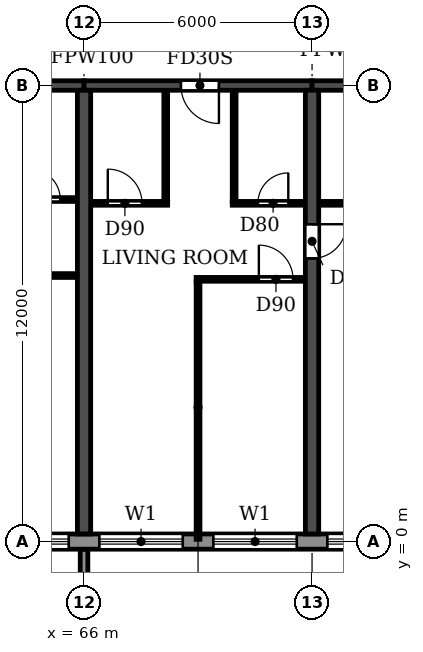
"""IFC4 building model, lengths in metres.
Left out: names, types, materials, properties, quantities, classifications, styles, units other than length and angle.
Written with IfcOpenShell. Run it as: python <this file> out.ifc"""

import sys

from ifc_helpers import new_model, si_unit, direction, frame, frame_2d, origin, place, context, subcontext, project, spatial, polyline, rectangle, outline, extrude, source, transform, mapped, element, fill, save


model = new_model("IFC4")
c1 = context("Model", 3, precision=1e-05, world=origin(), true_north=direction((0.0, 1.0)))
c2 = subcontext(c1, "Body", "Model", "MODEL_VIEW")
j1 = project(units=[si_unit("LENGTHUNIT", "METRE"), si_unit("PLANEANGLEUNIT", "RADIAN")], contexts=[c1])
p1 = place(None, origin())
s1 = spatial("IfcSite", under=j1, at=p1, CompositionType="ELEMENT")
p2 = place(p1, origin())
s2 = spatial("IfcBuilding", under=s1, at=p2, CompositionType="ELEMENT")
p3 = place(p2, frame((0.0, 0.0, 102.6)))
s3 = spatial("IfcBuildingStorey", under=s2, at=p3, CompositionType="ELEMENT", Elevation=102.6)
p4 = place(p3, frame((66.0, 0.2, 0.0), z_axis=(0.0, 0.0, 1.0), x_axis=(0.0, 1.0, 0.0)))
e1 = element("IfcWall", 1, at=p4, inside=s3, PredefinedType="SHEAR", context=c2, shape_type="SweptSolid", body=[
    extrude(rectangle(XDim=11.675, YDim=0.35, at=frame_2d((5.837, 0.0))), origin(), (0.0, 0.0, 1.0), 3.0),
])
p5 = place(p3, frame((72.0, 0.2, 0.0), z_axis=(0.0, 0.0, 1.0), x_axis=(0.0, 1.0, 0.0)))
e2 = element("IfcWall", 2, at=p5, inside=s3, PredefinedType="SHEAR", context=c2, shape_type="SweptSolid", body=[
    extrude(rectangle(XDim=11.675, YDim=0.35, at=frame_2d((5.837, 0.0))), origin(), (0.0, 0.0, 1.0), 3.0),
])
p6 = place(p5, frame((7.25, 0.0, 0.0)))
e3 = element("IfcOpeningElement", 3, at=p6, cuts=e2, PredefinedType="OPENING", context=c2, shape_type="SweptSolid", body=[
    extrude(rectangle(XDim=0.9, YDim=2.1, at=frame_2d((0.45, 1.05))), frame((0.0, 0.185, 0.0), z_axis=(0.0, -1.0, 0.0), x_axis=(1.0, 0.0, 0.0)), (0.0, 0.0, 1.0), 0.37),
])
p7 = place(p3, frame((60.0, 12.0, 0.0), z_axis=(0.0, 0.0, 1.0), x_axis=(1.0, 0.0, 0.0)))
e4 = element("IfcWall", 4, at=p7, inside=s3, PredefinedType="SHEAR", context=c2, shape_type="SweptSolid", body=[
    extrude(rectangle(XDim=6.0, YDim=0.25, at=frame_2d((3.0, 0.0))), origin(), (0.0, 0.0, 1.0), 2.4),
])
p8 = place(p7, frame((2.55, 0.0, 0.0)))
e5 = element("IfcOpeningElement", 5, at=p8, cuts=e4, PredefinedType="OPENING", context=c2, shape_type="SweptSolid", body=[
    extrude(rectangle(XDim=1.0, YDim=2.1, at=frame_2d((0.5, 1.05))), frame((0.0, 0.135, 0.0), z_axis=(0.0, -1.0, 0.0), x_axis=(1.0, 0.0, 0.0)), (0.0, 0.0, 1.0), 0.27),
])
p9 = place(p3, frame((66.0, 12.0, 0.0), z_axis=(0.0, 0.0, 1.0), x_axis=(1.0, 0.0, 0.0)))
e6 = element("IfcWall", 6, at=p9, inside=s3, PredefinedType="SHEAR", context=c2, shape_type="SweptSolid", body=[
    extrude(rectangle(XDim=6.0, YDim=0.25, at=frame_2d((3.0, 0.0))), origin(), (0.0, 0.0, 1.0), 2.4),
])
p10 = place(p9, frame((2.55, 0.0, 0.0)))
e7 = element("IfcOpeningElement", 7, at=p10, cuts=e6, PredefinedType="OPENING", context=c2, shape_type="SweptSolid", body=[
    extrude(rectangle(XDim=1.0, YDim=2.1, at=frame_2d((0.5, 1.05))), frame((0.0, 0.135, 0.0), z_axis=(0.0, -1.0, 0.0), x_axis=(1.0, 0.0, 0.0)), (0.0, 0.0, 1.0), 0.27),
])
p11 = place(p3, frame((72.0, 12.0, 0.0), z_axis=(0.0, 0.0, 1.0), x_axis=(1.0, 0.0, 0.0)))
e8 = element("IfcWall", 8, at=p11, inside=s3, PredefinedType="SHEAR", context=c2, shape_type="SweptSolid", body=[
    extrude(rectangle(XDim=6.0, YDim=0.25, at=frame_2d((3.0, 0.0))), origin(), (0.0, 0.0, 1.0), 2.4),
])
p12 = place(p3, frame((10.683, 0.0, 0.0), z_axis=(0.0, 0.0, 1.0), x_axis=(1.0, 0.0, 0.0)))
e9 = element("IfcWall", 9, at=p12, inside=s3, PredefinedType="STANDARD", context=c2, shape_type="SweptSolid", body=[
    extrude(rectangle(XDim=80.634, YDim=0.4, at=frame_2d((40.317, 0.0))), origin(), (0.0, 0.0, 1.0), 3.0),
])
p13 = place(p12, frame((1.717, 0.0, 0.9)))
e10 = element("IfcOpeningElement", 10, at=p13, cuts=e9, PredefinedType="OPENING", context=c2, shape_type="SweptSolid", body=[
    extrude(rectangle(XDim=2.2, YDim=1.5, at=frame_2d((1.1, 0.75))), frame((0.0, 0.21, 0.0), z_axis=(0.0, -1.0, 0.0), x_axis=(1.0, 0.0, 0.0)), (0.0, 0.0, 1.0), 0.42),
])
p14 = place(p12, frame((4.917, 0.0, 0.0)))
e11 = element("IfcOpeningElement", 11, at=p14, cuts=e9, PredefinedType="OPENING", context=c2, shape_type="SweptSolid", body=[
    extrude(rectangle(XDim=1.8, YDim=2.4, at=frame_2d((0.9, 1.2))), frame((0.0, 0.21, 0.0), z_axis=(0.0, -1.0, 0.0), x_axis=(1.0, 0.0, 0.0)), (0.0, 0.0, 1.0), 0.42),
])
p15 = place(p12, frame((7.717, 0.0, 0.9)))
e12 = element("IfcOpeningElement", 12, at=p15, cuts=e9, PredefinedType="OPENING", context=c2, shape_type="SweptSolid", body=[
    extrude(rectangle(XDim=2.2, YDim=1.5, at=frame_2d((1.1, 0.75))), frame((0.0, 0.21, 0.0), z_axis=(0.0, -1.0, 0.0), x_axis=(1.0, 0.0, 0.0)), (0.0, 0.0, 1.0), 0.42),
])
p16 = place(p12, frame((10.717, 0.0, 0.9)))
e13 = element("IfcOpeningElement", 13, at=p16, cuts=e9, PredefinedType="OPENING", context=c2, shape_type="SweptSolid", body=[
    extrude(rectangle(XDim=2.2, YDim=1.5, at=frame_2d((1.1, 0.75))), frame((0.0, 0.21, 0.0), z_axis=(0.0, -1.0, 0.0), x_axis=(1.0, 0.0, 0.0)), (0.0, 0.0, 1.0), 0.42),
])
p17 = place(p12, frame((13.717, 0.0, 0.9)))
e14 = element("IfcOpeningElement", 14, at=p17, cuts=e9, PredefinedType="OPENING", context=c2, shape_type="SweptSolid", body=[
    extrude(rectangle(XDim=2.2, YDim=1.5, at=frame_2d((1.1, 0.75))), frame((0.0, 0.21, 0.0), z_axis=(0.0, -1.0, 0.0), x_axis=(1.0, 0.0, 0.0)), (0.0, 0.0, 1.0), 0.42),
])
p18 = place(p12, frame((16.717, 0.0, 0.9)))
e15 = element("IfcOpeningElement", 15, at=p18, cuts=e9, PredefinedType="OPENING", context=c2, shape_type="SweptSolid", body=[
    extrude(rectangle(XDim=2.2, YDim=1.5, at=frame_2d((1.1, 0.75))), frame((0.0, 0.21, 0.0), z_axis=(0.0, -1.0, 0.0), x_axis=(1.0, 0.0, 0.0)), (0.0, 0.0, 1.0), 0.42),
])
p19 = place(p12, frame((19.717, 0.0, 0.9)))
e16 = element("IfcOpeningElement", 16, at=p19, cuts=e9, PredefinedType="OPENING", context=c2, shape_type="SweptSolid", body=[
    extrude(rectangle(XDim=2.2, YDim=1.5, at=frame_2d((1.1, 0.75))), frame((0.0, 0.21, 0.0), z_axis=(0.0, -1.0, 0.0), x_axis=(1.0, 0.0, 0.0)), (0.0, 0.0, 1.0), 0.42),
])
p20 = place(p12, frame((22.717, 0.0, 0.9)))
e17 = element("IfcOpeningElement", 17, at=p20, cuts=e9, PredefinedType="OPENING", context=c2, shape_type="SweptSolid", body=[
    extrude(rectangle(XDim=2.2, YDim=1.5, at=frame_2d((1.1, 0.75))), frame((0.0, 0.21, 0.0), z_axis=(0.0, -1.0, 0.0), x_axis=(1.0, 0.0, 0.0)), (0.0, 0.0, 1.0), 0.42),
])
p21 = place(p12, frame((25.717, 0.0, 0.9)))
e18 = element("IfcOpeningElement", 18, at=p21, cuts=e9, PredefinedType="OPENING", context=c2, shape_type="SweptSolid", body=[
    extrude(rectangle(XDim=2.2, YDim=1.5, at=frame_2d((1.1, 0.75))), frame((0.0, 0.21, 0.0), z_axis=(0.0, -1.0, 0.0), x_axis=(1.0, 0.0, 0.0)), (0.0, 0.0, 1.0), 0.42),
])
p22 = place(p12, frame((28.917, 0.0, 0.0)))
e19 = element("IfcOpeningElement", 19, at=p22, cuts=e9, PredefinedType="OPENING", context=c2, shape_type="SweptSolid", body=[
    extrude(rectangle(XDim=1.8, YDim=2.4, at=frame_2d((0.9, 1.2))), frame((0.0, 0.21, 0.0), z_axis=(0.0, -1.0, 0.0), x_axis=(1.0, 0.0, 0.0)), (0.0, 0.0, 1.0), 0.42),
])
p23 = place(p12, frame((31.717, 0.0, 0.9)))
e20 = element("IfcOpeningElement", 20, at=p23, cuts=e9, PredefinedType="OPENING", context=c2, shape_type="SweptSolid", body=[
    extrude(rectangle(XDim=2.2, YDim=1.5, at=frame_2d((1.1, 0.75))), frame((0.0, 0.21, 0.0), z_axis=(0.0, -1.0, 0.0), x_axis=(1.0, 0.0, 0.0)), (0.0, 0.0, 1.0), 0.42),
])
p24 = place(p12, frame((34.717, 0.0, 0.9)))
e21 = element("IfcOpeningElement", 21, at=p24, cuts=e9, PredefinedType="OPENING", context=c2, shape_type="SweptSolid", body=[
    extrude(rectangle(XDim=2.2, YDim=1.5, at=frame_2d((1.1, 0.75))), frame((0.0, 0.21, 0.0), z_axis=(0.0, -1.0, 0.0), x_axis=(1.0, 0.0, 0.0)), (0.0, 0.0, 1.0), 0.42),
])
p25 = place(p12, frame((37.717, 0.0, 0.9)))
e22 = element("IfcOpeningElement", 22, at=p25, cuts=e9, PredefinedType="OPENING", context=c2, shape_type="SweptSolid", body=[
    extrude(rectangle(XDim=2.2, YDim=1.5, at=frame_2d((1.1, 0.75))), frame((0.0, 0.21, 0.0), z_axis=(0.0, -1.0, 0.0), x_axis=(1.0, 0.0, 0.0)), (0.0, 0.0, 1.0), 0.42),
])
p26 = place(p12, frame((40.717, 0.0, 0.9)))
e23 = element("IfcOpeningElement", 23, at=p26, cuts=e9, PredefinedType="OPENING", context=c2, shape_type="SweptSolid", body=[
    extrude(rectangle(XDim=2.2, YDim=1.5, at=frame_2d((1.1, 0.75))), frame((0.0, 0.21, 0.0), z_axis=(0.0, -1.0, 0.0), x_axis=(1.0, 0.0, 0.0)), (0.0, 0.0, 1.0), 0.42),
])
p27 = place(p12, frame((43.717, 0.0, 0.9)))
e24 = element("IfcOpeningElement", 24, at=p27, cuts=e9, PredefinedType="OPENING", context=c2, shape_type="SweptSolid", body=[
    extrude(rectangle(XDim=2.2, YDim=1.5, at=frame_2d((1.1, 0.75))), frame((0.0, 0.21, 0.0), z_axis=(0.0, -1.0, 0.0), x_axis=(1.0, 0.0, 0.0)), (0.0, 0.0, 1.0), 0.42),
])
p28 = place(p12, frame((46.717, 0.0, 0.9)))
e25 = element("IfcOpeningElement", 25, at=p28, cuts=e9, PredefinedType="OPENING", context=c2, shape_type="SweptSolid", body=[
    extrude(rectangle(XDim=2.2, YDim=1.5, at=frame_2d((1.1, 0.75))), frame((0.0, 0.21, 0.0), z_axis=(0.0, -1.0, 0.0), x_axis=(1.0, 0.0, 0.0)), (0.0, 0.0, 1.0), 0.42),
])
p29 = place(p12, frame((49.917, 0.0, 0.0)))
e26 = element("IfcOpeningElement", 26, at=p29, cuts=e9, PredefinedType="OPENING", context=c2, shape_type="SweptSolid", body=[
    extrude(rectangle(XDim=1.8, YDim=2.4, at=frame_2d((0.9, 1.2))), frame((0.0, 0.21, 0.0), z_axis=(0.0, -1.0, 0.0), x_axis=(1.0, 0.0, 0.0)), (0.0, 0.0, 1.0), 0.42),
])
p30 = place(p12, frame((52.717, 0.0, 0.9)))
e27 = element("IfcOpeningElement", 27, at=p30, cuts=e9, PredefinedType="OPENING", context=c2, shape_type="SweptSolid", body=[
    extrude(rectangle(XDim=2.2, YDim=1.5, at=frame_2d((1.1, 0.75))), frame((0.0, 0.21, 0.0), z_axis=(0.0, -1.0, 0.0), x_axis=(1.0, 0.0, 0.0)), (0.0, 0.0, 1.0), 0.42),
])
p31 = place(p12, frame((55.717, 0.0, 0.9)))
e28 = element("IfcOpeningElement", 28, at=p31, cuts=e9, PredefinedType="OPENING", context=c2, shape_type="SweptSolid", body=[
    extrude(rectangle(XDim=2.2, YDim=1.5, at=frame_2d((1.1, 0.75))), frame((0.0, 0.21, 0.0), z_axis=(0.0, -1.0, 0.0), x_axis=(1.0, 0.0, 0.0)), (0.0, 0.0, 1.0), 0.42),
])
p32 = place(p12, frame((58.717, 0.0, 0.9)))
e29 = element("IfcOpeningElement", 29, at=p32, cuts=e9, PredefinedType="OPENING", context=c2, shape_type="SweptSolid", body=[
    extrude(rectangle(XDim=2.2, YDim=1.5, at=frame_2d((1.1, 0.75))), frame((0.0, 0.21, 0.0), z_axis=(0.0, -1.0, 0.0), x_axis=(1.0, 0.0, 0.0)), (0.0, 0.0, 1.0), 0.42),
])
p33 = place(p12, frame((61.717, 0.0, 0.9)))
e30 = element("IfcOpeningElement", 30, at=p33, cuts=e9, PredefinedType="OPENING", context=c2, shape_type="SweptSolid", body=[
    extrude(rectangle(XDim=2.2, YDim=1.5, at=frame_2d((1.1, 0.75))), frame((0.0, 0.21, 0.0), z_axis=(0.0, -1.0, 0.0), x_axis=(1.0, 0.0, 0.0)), (0.0, 0.0, 1.0), 0.42),
])
p34 = place(p12, frame((64.717, 0.0, 0.9)))
e31 = element("IfcOpeningElement", 31, at=p34, cuts=e9, PredefinedType="OPENING", context=c2, shape_type="SweptSolid", body=[
    extrude(rectangle(XDim=2.2, YDim=1.5, at=frame_2d((1.1, 0.75))), frame((0.0, 0.21, 0.0), z_axis=(0.0, -1.0, 0.0), x_axis=(1.0, 0.0, 0.0)), (0.0, 0.0, 1.0), 0.42),
])
p35 = place(p12, frame((67.717, 0.0, 0.9)))
e32 = element("IfcOpeningElement", 32, at=p35, cuts=e9, PredefinedType="OPENING", context=c2, shape_type="SweptSolid", body=[
    extrude(rectangle(XDim=2.2, YDim=1.5, at=frame_2d((1.1, 0.75))), frame((0.0, 0.21, 0.0), z_axis=(0.0, -1.0, 0.0), x_axis=(1.0, 0.0, 0.0)), (0.0, 0.0, 1.0), 0.42),
])
p36 = place(p12, frame((70.717, 0.0, 0.9)))
e33 = element("IfcOpeningElement", 33, at=p36, cuts=e9, PredefinedType="OPENING", context=c2, shape_type="SweptSolid", body=[
    extrude(rectangle(XDim=2.2, YDim=1.5, at=frame_2d((1.1, 0.75))), frame((0.0, 0.21, 0.0), z_axis=(0.0, -1.0, 0.0), x_axis=(1.0, 0.0, 0.0)), (0.0, 0.0, 1.0), 0.42),
])
p37 = place(p12, frame((73.717, 0.0, 0.9)))
e34 = element("IfcOpeningElement", 34, at=p37, cuts=e9, PredefinedType="OPENING", context=c2, shape_type="SweptSolid", body=[
    extrude(rectangle(XDim=2.2, YDim=1.5, at=frame_2d((1.1, 0.75))), frame((0.0, 0.21, 0.0), z_axis=(0.0, -1.0, 0.0), x_axis=(1.0, 0.0, 0.0)), (0.0, 0.0, 1.0), 0.42),
])
p38 = place(p12, frame((76.917, 0.0, 0.0)))
e35 = element("IfcOpeningElement", 35, at=p38, cuts=e9, PredefinedType="OPENING", context=c2, shape_type="SweptSolid", body=[
    extrude(rectangle(XDim=1.8, YDim=2.4, at=frame_2d((0.9, 1.2))), frame((0.0, 0.21, 0.0), z_axis=(0.0, -1.0, 0.0), x_axis=(1.0, 0.0, 0.0)), (0.0, 0.0, 1.0), 0.42),
])
m1 = source(origin(), c2, "Body", "SweptSolid", [
    extrude(outline(polyline([(0.0, 0.0), (0.2, 0.0), (0.2, 1.65), (0.0, 1.65), (0.0, 0.0)])), origin(), (0.0, 0.0, 1.0), 3.1),
])
p39 = place(p3, frame((65.9, -1.85, 0.0)))
e36 = element("IfcWall", 36, at=p39, inside=s3, PredefinedType="STANDARD", context=c2, shape_type="MappedRepresentation", body=[
    mapped(m1, transform((0.0, 0.0, 0.0))),
])
p40 = place(p3, frame((68.95, 6.9, 0.0), z_axis=(0.0, 0.0, 1.0), x_axis=(1.0, 0.0, 0.0)))
e37 = element("IfcWall", 37, at=p40, inside=s3, PredefinedType="PARTITIONING", context=c2, shape_type="SweptSolid", body=[
    extrude(rectangle(XDim=2.865, YDim=0.1, at=frame_2d((1.433, 0.0))), origin(), (0.0, 0.0, 1.0), 3.0),
])
p41 = place(p40, frame((1.65, 0.0, 0.0)))
e38 = element("IfcOpeningElement", 38, at=p41, cuts=e37, PredefinedType="OPENING", context=c2, shape_type="SweptSolid", body=[
    extrude(rectangle(XDim=0.9, YDim=2.1, at=frame_2d((0.45, 1.05))), frame((0.0, 0.06, 0.0), z_axis=(0.0, -1.0, 0.0), x_axis=(1.0, 0.0, 0.0)), (0.0, 0.0, 1.0), 0.12),
])
p42 = place(p3, frame((62.95, 7.0, 0.0), z_axis=(0.0, 0.0, 1.0), x_axis=(1.0, 0.0, 0.0)))
e39 = element("IfcWall", 39, at=p42, inside=s3, PredefinedType="PARTITIONING", context=c2, shape_type="SweptSolid", body=[
    extrude(rectangle(XDim=2.865, YDim=0.1, at=frame_2d((1.433, 0.0))), origin(), (0.0, 0.0, 1.0), 3.0),
])
p43 = place(p42, frame((0.55, 0.0, 0.0)))
e40 = element("IfcOpeningElement", 40, at=p43, cuts=e39, PredefinedType="OPENING", context=c2, shape_type="SweptSolid", body=[
    extrude(rectangle(XDim=0.9, YDim=2.1, at=frame_2d((0.45, 1.05))), frame((0.0, 0.06, 0.0), z_axis=(0.0, -1.0, 0.0), x_axis=(1.0, 0.0, 0.0)), (0.0, 0.0, 1.0), 0.12),
])
p44 = place(p3, frame((66.185, 8.9, 0.0), z_axis=(0.0, 0.0, 1.0), x_axis=(1.0, 0.0, 0.0)))
e41 = element("IfcWall", 41, at=p44, inside=s3, PredefinedType="PARTITIONING", context=c2, shape_type="SweptSolid", body=[
    extrude(rectangle(XDim=2.015, YDim=0.1, at=frame_2d((1.007, 0.0))), origin(), (0.0, 0.0, 1.0), 3.0),
])
p45 = place(p44, frame((0.44, 0.0, 0.0)))
e42 = element("IfcOpeningElement", 42, at=p45, cuts=e41, PredefinedType="OPENING", context=c2, shape_type="SweptSolid", body=[
    extrude(rectangle(XDim=0.9, YDim=2.1, at=frame_2d((0.45, 1.05))), frame((0.0, 0.06, 0.0), z_axis=(0.0, -1.0, 0.0), x_axis=(1.0, 0.0, 0.0)), (0.0, 0.0, 1.0), 0.12),
])
p46 = place(p3, frame((69.9, 8.9, 0.0), z_axis=(0.0, 0.0, 1.0), x_axis=(1.0, 0.0, 0.0)))
e43 = element("IfcWall", 43, at=p46, inside=s3, PredefinedType="PARTITIONING", context=c2, shape_type="SweptSolid", body=[
    extrude(rectangle(XDim=1.915, YDim=0.1, at=frame_2d((0.958, 0.0))), origin(), (0.0, 0.0, 1.0), 3.0),
])
p47 = place(p46, frame((0.675, 0.0, 0.0)))
e44 = element("IfcOpeningElement", 44, at=p47, cuts=e43, PredefinedType="OPENING", context=c2, shape_type="SweptSolid", body=[
    extrude(rectangle(XDim=0.8, YDim=2.1, at=frame_2d((0.4, 1.05))), frame((0.0, 0.06, 0.0), z_axis=(0.0, -1.0, 0.0), x_axis=(1.0, 0.0, 0.0)), (0.0, 0.0, 1.0), 0.12),
])
p48 = place(p3, frame((72.185, 8.9, 0.0), z_axis=(0.0, 0.0, 1.0), x_axis=(1.0, 0.0, 0.0)))
e45 = element("IfcWall", 45, at=p48, inside=s3, PredefinedType="PARTITIONING", context=c2, shape_type="SweptSolid", body=[
    extrude(rectangle(XDim=2.715, YDim=0.1, at=frame_2d((1.357, 0.0))), origin(), (0.0, 0.0, 1.0), 3.0),
])
p49 = place(p48, frame((0.915, 0.0, 0.0)))
e46 = element("IfcOpeningElement", 46, at=p49, cuts=e45, PredefinedType="OPENING", context=c2, shape_type="SweptSolid", body=[
    extrude(rectangle(XDim=0.8, YDim=2.1, at=frame_2d((0.4, 1.05))), frame((0.0, 0.06, 0.0), z_axis=(0.0, -1.0, 0.0), x_axis=(1.0, 0.0, 0.0)), (0.0, 0.0, 1.0), 0.12),
])
p50 = place(p3, frame((63.9, 9.0, 0.0), z_axis=(0.0, 0.0, 1.0), x_axis=(1.0, 0.0, 0.0)))
e47 = element("IfcWall", 47, at=p50, inside=s3, PredefinedType="PARTITIONING", context=c2, shape_type="SweptSolid", body=[
    extrude(rectangle(XDim=1.915, YDim=0.1, at=frame_2d((0.958, 0.0))), origin(), (0.0, 0.0, 1.0), 3.0),
])
p51 = place(p50, frame((0.675, 0.0, 0.0)))
e48 = element("IfcOpeningElement", 48, at=p51, cuts=e47, PredefinedType="OPENING", context=c2, shape_type="SweptSolid", body=[
    extrude(rectangle(XDim=0.8, YDim=2.1, at=frame_2d((0.4, 1.05))), frame((0.0, 0.06, 0.0), z_axis=(0.0, -1.0, 0.0), x_axis=(1.0, 0.0, 0.0)), (0.0, 0.0, 1.0), 0.12),
])
p52 = place(p3, frame((68.15, 8.95, 0.0), z_axis=(0.0, 0.0, 1.0), x_axis=(0.0, 1.0, 0.0)))
e49 = element("IfcWall", 49, at=p52, inside=s3, PredefinedType="PARTITIONING", context=c2, shape_type="SweptSolid", body=[
    extrude(rectangle(XDim=2.915, YDim=0.1, at=frame_2d((1.458, 0.0))), origin(), (0.0, 0.0, 1.0), 3.0),
])
p53 = place(p3, frame((69.0, 0.06, 0.0), z_axis=(0.0, 0.0, 1.0), x_axis=(0.0, 1.0, 0.0)))
e50 = element("IfcWall", 50, at=p53, inside=s3, PredefinedType="PARTITIONING", context=c2, shape_type="SweptSolid", body=[
    extrude(rectangle(XDim=6.79, YDim=0.1, at=frame_2d((3.395, 0.0))), origin(), (0.0, 0.0, 1.0), 3.0),
])
p54 = place(p3, frame((69.95, 8.95, 0.0), z_axis=(0.0, 0.0, 1.0), x_axis=(0.0, 1.0, 0.0)))
e51 = element("IfcWall", 51, at=p54, inside=s3, PredefinedType="PARTITIONING", context=c2, shape_type="SweptSolid", body=[
    extrude(rectangle(XDim=2.915, YDim=0.1, at=frame_2d((1.458, 0.0))), origin(), (0.0, 0.0, 1.0), 3.0),
])
p55 = place(p30, origin())
e52 = element("IfcWindow", 52, at=p55, inside=s3, PartitioningType="DOUBLE_PANEL_HORIZONTAL", PredefinedType="WINDOW", context=c2, shape_type="SweptSolid", body=[
    extrude(rectangle(XDim=2.2, YDim=1.5, at=frame_2d((1.1, 0.75))), frame((0.0, 0.03, 0.0), z_axis=(0.0, -1.0, 0.0), x_axis=(1.0, 0.0, 0.0)), (0.0, 0.0, 1.0), 0.06),
])
fill(e27, e52)
p56 = place(p31, origin())
e53 = element("IfcWindow", 53, at=p56, inside=s3, PartitioningType="DOUBLE_PANEL_HORIZONTAL", PredefinedType="WINDOW", context=c2, shape_type="SweptSolid", body=[
    extrude(rectangle(XDim=2.2, YDim=1.5, at=frame_2d((1.1, 0.75))), frame((0.0, 0.03, 0.0), z_axis=(0.0, -1.0, 0.0), x_axis=(1.0, 0.0, 0.0)), (0.0, 0.0, 1.0), 0.06),
])
fill(e28, e53)
p57 = place(p32, origin())
e54 = element("IfcWindow", 54, at=p57, inside=s3, PartitioningType="DOUBLE_PANEL_HORIZONTAL", PredefinedType="WINDOW", context=c2, shape_type="SweptSolid", body=[
    extrude(rectangle(XDim=2.2, YDim=1.5, at=frame_2d((1.1, 0.75))), frame((0.0, 0.03, 0.0), z_axis=(0.0, -1.0, 0.0), x_axis=(1.0, 0.0, 0.0)), (0.0, 0.0, 1.0), 0.06),
])
fill(e29, e54)
p58 = place(p33, origin())
e55 = element("IfcWindow", 55, at=p58, inside=s3, PartitioningType="DOUBLE_PANEL_HORIZONTAL", PredefinedType="WINDOW", context=c2, shape_type="SweptSolid", body=[
    extrude(rectangle(XDim=2.2, YDim=1.5, at=frame_2d((1.1, 0.75))), frame((0.0, 0.03, 0.0), z_axis=(0.0, -1.0, 0.0), x_axis=(1.0, 0.0, 0.0)), (0.0, 0.0, 1.0), 0.06),
])
fill(e30, e55)
p59 = place(p51, origin())
e56 = element("IfcDoor", 56, at=p59, inside=s3, OperationType="SINGLE_SWING_LEFT", PredefinedType="DOOR", context=c2, shape_type="SweptSolid", body=[
    extrude(rectangle(XDim=0.8, YDim=2.1, at=frame_2d((0.4, 1.05))), frame((0.0, 0.025, 0.0), z_axis=(0.0, -1.0, 0.0), x_axis=(1.0, 0.0, 0.0)), (0.0, 0.0, 1.0), 0.05),
])
fill(e48, e56)
p60 = place(p45, origin())
e57 = element("IfcDoor", 57, at=p60, inside=s3, OperationType="SINGLE_SWING_LEFT", PredefinedType="DOOR", context=c2, shape_type="SweptSolid", body=[
    extrude(rectangle(XDim=0.9, YDim=2.1, at=frame_2d((0.45, 1.05))), frame((0.0, 0.025, 0.0), z_axis=(0.0, -1.0, 0.0), x_axis=(1.0, 0.0, 0.0)), (0.0, 0.0, 1.0), 0.05),
])
fill(e42, e57)
p61 = place(p10, frame((1.0, 0.0, 0.0), z_axis=(0.0, 0.0, 1.0), x_axis=(-1.0, 0.0, 0.0)))
e58 = element("IfcDoor", 58, at=p61, inside=s3, OperationType="SINGLE_SWING_LEFT", PredefinedType="DOOR", context=c2, shape_type="SweptSolid", body=[
    extrude(rectangle(XDim=1.0, YDim=2.1, at=frame_2d((0.5, 1.05))), frame((0.0, 0.025, 0.0), z_axis=(0.0, -1.0, 0.0), x_axis=(1.0, 0.0, 0.0)), (0.0, 0.0, 1.0), 0.05),
])
fill(e7, e58)
p62 = place(p47, origin())
e59 = element("IfcDoor", 59, at=p62, inside=s3, OperationType="SINGLE_SWING_RIGHT", PredefinedType="DOOR", context=c2, shape_type="SweptSolid", body=[
    extrude(rectangle(XDim=0.8, YDim=2.1, at=frame_2d((0.4, 1.05))), frame((0.0, 0.025, 0.0), z_axis=(0.0, -1.0, 0.0), x_axis=(1.0, 0.0, 0.0)), (0.0, 0.0, 1.0), 0.05),
])
fill(e44, e59)
p63 = place(p41, origin())
e60 = element("IfcDoor", 60, at=p63, inside=s3, OperationType="SINGLE_SWING_LEFT", PredefinedType="DOOR", context=c2, shape_type="SweptSolid", body=[
    extrude(rectangle(XDim=0.9, YDim=2.1, at=frame_2d((0.45, 1.05))), frame((0.0, 0.025, 0.0), z_axis=(0.0, -1.0, 0.0), x_axis=(1.0, 0.0, 0.0)), (0.0, 0.0, 1.0), 0.05),
])
fill(e38, e60)
p64 = place(p6, frame((0.9, 0.0, 0.0), z_axis=(0.0, 0.0, 1.0), x_axis=(-1.0, 0.0, 0.0)))
e61 = element("IfcDoor", 61, at=p64, inside=s3, OperationType="SINGLE_SWING_LEFT", PredefinedType="DOOR", context=c2, shape_type="SweptSolid", body=[
    extrude(rectangle(XDim=0.9, YDim=2.1, at=frame_2d((0.45, 1.05))), frame((0.0, 0.025, 0.0), z_axis=(0.0, -1.0, 0.0), x_axis=(1.0, 0.0, 0.0)), (0.0, 0.0, 1.0), 0.05),
])
fill(e3, e61)
save(model, sys.argv[1])
